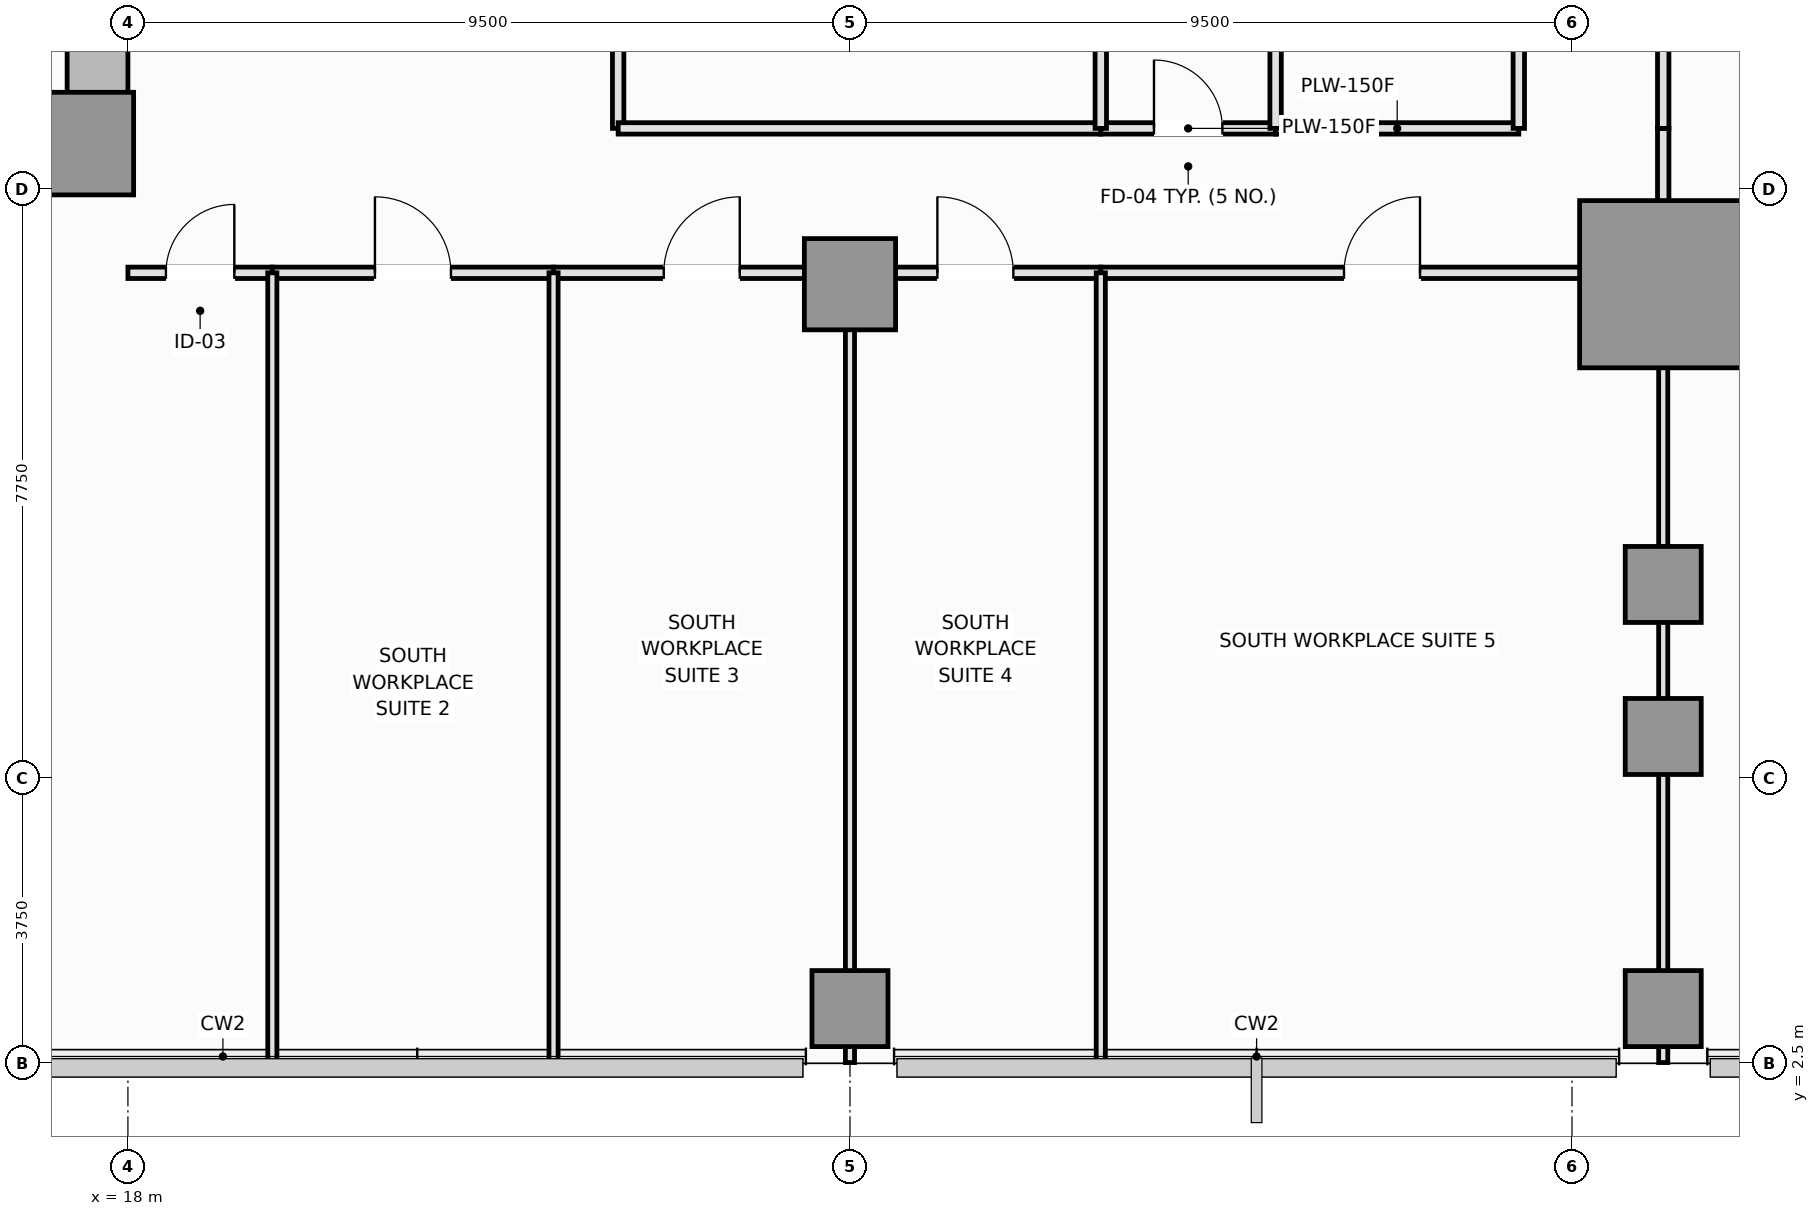
"""IFC4 building model, lengths in metres.
Left out: names, types, materials, properties, quantities, classifications, styles, units other than length and angle.
Written with IfcOpenShell. Run it as: python <this file> out.ifc"""

import sys

from ifc_helpers import new_model, si_unit, direction, frame, frame_2d, origin, origin_2d, place, context, subcontext, project, spatial, rectangle, extrude, element, fill, save


model = new_model("IFC4")
c1 = context("Model", 3, precision=1e-05, world=origin(), true_north=direction((0.0, 1.0)))
c2 = subcontext(c1, "Body", "Model", "MODEL_VIEW")
j1 = project(units=[si_unit("LENGTHUNIT", "METRE"), si_unit("PLANEANGLEUNIT", "RADIAN")], contexts=[c1])
p1 = place(None, origin())
s1 = spatial("IfcSite", under=j1, at=p1, CompositionType="ELEMENT")
p2 = place(p1, origin())
s2 = spatial("IfcBuilding", under=s1, at=p2, CompositionType="ELEMENT")
p3 = place(p2, frame((0.0, 0.0, 78.85)))
s3 = spatial("IfcBuildingStorey", under=s2, at=p3, CompositionType="ELEMENT", Elevation=78.85)
p4 = place(p3, frame((4.5, 14.4, 0.0), z_axis=(0.0, 0.0, 1.0), x_axis=(1.0, 0.0, 0.0)))
e1 = element("IfcWall", 1, at=p4, inside=s3, PredefinedType="SHEAR", context=c2, shape_type="SweptSolid", body=[
    extrude(rectangle(XDim=13.5, YDim=0.8, at=frame_2d((6.75, 0.0))), origin(), (0.0, 0.0, 1.0), 3.55),
])
p5 = place(p3, frame((17.6, 14.8, 0.0), z_axis=(0.0, 0.0, 1.0), x_axis=(0.0, 1.0, 0.0)))
e2 = element("IfcWall", 2, at=p5, inside=s3, PredefinedType="SHEAR", context=c2, shape_type="SweptSolid", body=[
    extrude(rectangle(XDim=8.65, YDim=0.8, at=frame_2d((4.325, 0.0))), origin(), (0.0, 0.0, 1.0), 3.55),
])
p6 = place(p5, frame((4.1, 0.0, 0.0)))
e3 = element("IfcOpeningElement", 3, at=p6, cuts=e2, PredefinedType="OPENING", context=c2, shape_type="SweptSolid", body=[
    extrude(rectangle(XDim=1.1, YDim=2.15, at=frame_2d((0.55, 1.075))), frame((0.0, 0.41, 0.0), z_axis=(0.0, -1.0, 0.0), x_axis=(1.0, 0.0, 0.0)), (0.0, 0.0, 1.0), 0.82),
])
p7 = place(p3, frame((17.4, 14.6, 0.0), z_axis=(0.0, 0.0, 1.0), x_axis=(1.0, 0.0, 0.0)))
e4 = element("IfcColumn", 4, at=p7, inside=s3, PredefinedType="PILASTER", context=c2, shape_type="SweptSolid", body=[
    extrude(rectangle(XDim=1.35, YDim=1.35, at=origin_2d()), origin(), (0.0, 0.0, 1.0), 3.55),
])
p8 = place(p3, frame((38.2, 12.75, 0.0), z_axis=(0.0, 0.0, 1.0), x_axis=(1.0, 0.0, 0.0)))
e5 = element("IfcColumn", 5, at=p8, inside=s3, PredefinedType="COLUMN", context=c2, shape_type="SweptSolid", body=[
    extrude(rectangle(XDim=2.2, YDim=2.2, at=origin_2d()), origin(), (0.0, 0.0, 1.0), 3.55),
])
p9 = place(p3, frame((27.5, 12.75, 0.0), z_axis=(0.0, 0.0, 1.0), x_axis=(1.0, 0.0, 0.0)))
e6 = element("IfcColumn", 6, at=p9, inside=s3, PredefinedType="COLUMN", context=c2, shape_type="SweptSolid", body=[
    extrude(rectangle(XDim=1.2, YDim=1.2, at=origin_2d()), origin(), (0.0, 0.0, 1.0), 3.55),
])
for number, where, z_axis, x_axis in (
    (7, (38.2, 6.8, 0.0), (0.0, 0.0, 1.0), (1.0, 0.0, 0.0)),
    (8, (38.2, 8.8, 0.0), (0.0, 0.0, 1.0), (1.0, 0.0, 0.0)),
    (9, (27.5, 3.22, 0.0), (0.0, 0.0, 1.0), (1.0, 0.0, 0.0)),
    (10, (38.2, 3.22, 0.0), (0.0, 0.0, 1.0), (1.0, 0.0, 0.0)),
):
    element("IfcColumn", number, at=place(p3, frame(where, z_axis=z_axis, x_axis=x_axis)), inside=s3, PredefinedType="COLUMN", context=c2, shape_type="SweptSolid", body=[
        extrude(rectangle(XDim=1.0, YDim=1.0, at=origin_2d()), origin(), (0.0, 0.0, 1.0), 3.55),
    ])
p10 = place(p3, frame((24.45, 14.8, 0.0), z_axis=(0.0, 0.0, 1.0), x_axis=(0.0, 1.0, 0.0)))
e11 = element("IfcWall", 11, at=p10, inside=s3, PredefinedType="PARTITIONING", context=c2, shape_type="SweptSolid", body=[
    extrude(rectangle(XDim=3.1, YDim=0.15, at=frame_2d((1.55, 0.0))), origin(), (0.0, 0.0, 1.0), 3.37),
])
p11 = place(p10, frame((1.05, 0.0, 0.0)))
e12 = element("IfcOpeningElement", 12, at=p11, cuts=e11, PredefinedType="OPENING", context=c2, shape_type="SweptSolid", body=[
    extrude(rectangle(XDim=1.0, YDim=2.15, at=frame_2d((0.5, 1.075))), frame((0.0, 0.085, 0.0), z_axis=(0.0, -1.0, 0.0), x_axis=(1.0, 0.0, 0.0)), (0.0, 0.0, 1.0), 0.17),
])
p12 = place(p3, frame((33.1, 14.8, 0.0), z_axis=(0.0, 0.0, 1.0), x_axis=(1.0, 0.0, 0.0)))
e13 = element("IfcWall", 13, at=p12, inside=s3, PredefinedType="PLUMBINGWALL", context=c2, shape_type="SweptSolid", body=[
    extrude(rectangle(XDim=3.2, YDim=0.15, at=frame_2d((1.6, 0.0))), origin(), (0.0, 0.0, 1.0), 3.37),
])
p13 = place(p3, frame((30.8, 14.8, 0.0), z_axis=(0.0, 0.0, 1.0), x_axis=(1.0, 0.0, 0.0)))
e14 = element("IfcWall", 14, at=p13, inside=s3, PredefinedType="PLUMBINGWALL", context=c2, shape_type="SweptSolid", body=[
    extrude(rectangle(XDim=2.3, YDim=0.15, at=frame_2d((1.15, 0.0))), origin(), (0.0, 0.0, 1.0), 3.37),
])
p14 = place(p13, frame((0.7, 0.0, 0.0)))
e15 = element("IfcOpeningElement", 15, at=p14, cuts=e14, PredefinedType="OPENING", context=c2, shape_type="SweptSolid", body=[
    extrude(rectangle(XDim=0.9, YDim=2.1, at=frame_2d((0.45, 1.05))), frame((0.0, 0.085, 0.0), z_axis=(0.0, -1.0, 0.0), x_axis=(1.0, 0.0, 0.0)), (0.0, 0.0, 1.0), 0.17),
])
p15 = place(p3, frame((24.45, 14.8, 0.0), z_axis=(0.0, 0.0, 1.0), x_axis=(1.0, 0.0, 0.0)))
e16 = element("IfcWall", 16, at=p15, inside=s3, PredefinedType="PARTITIONING", context=c2, shape_type="SweptSolid", body=[
    extrude(rectangle(XDim=6.35, YDim=0.15, at=frame_2d((3.175, 0.0))), origin(), (0.0, 0.0, 1.0), 3.37),
])
p16 = place(p3, frame((18.0, 12.9, 0.0), z_axis=(0.0, 0.0, 1.0), x_axis=(1.0, 0.0, 0.0)))
e17 = element("IfcWall", 17, at=p16, inside=s3, PredefinedType="PARTITIONING", context=c2, shape_type="SweptSolid", body=[
    extrude(rectangle(XDim=1.9, YDim=0.15, at=frame_2d((0.95, 0.0))), origin(), (0.0, 0.0, 1.0), 2.72),
])
p17 = place(p16, frame((0.5, 0.0, 0.0)))
e18 = element("IfcOpeningElement", 18, at=p17, cuts=e17, PredefinedType="OPENING", context=c2, shape_type="SweptSolid", body=[
    extrude(rectangle(XDim=0.9, YDim=2.1, at=frame_2d((0.45, 1.05))), frame((0.0, 0.085, 0.0), z_axis=(0.0, -1.0, 0.0), x_axis=(1.0, 0.0, 0.0)), (0.0, 0.0, 1.0), 0.17),
])
p18 = place(p3, frame((19.9, 12.9, 0.0), z_axis=(0.0, 0.0, 1.0), x_axis=(1.0, 0.0, 0.0)))
e19 = element("IfcWall", 19, at=p18, inside=s3, PredefinedType="PARTITIONING", context=c2, shape_type="SweptSolid", body=[
    extrude(rectangle(XDim=3.7, YDim=0.15, at=frame_2d((1.85, 0.0))), origin(), (0.0, 0.0, 1.0), 2.72),
])
p19 = place(p18, frame((1.35, 0.0, 0.0)))
e20 = element("IfcOpeningElement", 20, at=p19, cuts=e19, PredefinedType="OPENING", context=c2, shape_type="SweptSolid", body=[
    extrude(rectangle(XDim=1.0, YDim=2.15, at=frame_2d((0.5, 1.075))), frame((0.0, 0.085, 0.0), z_axis=(0.0, -1.0, 0.0), x_axis=(1.0, 0.0, 0.0)), (0.0, 0.0, 1.0), 0.17),
])
p20 = place(p3, frame((23.6, 12.9, 0.0), z_axis=(0.0, 0.0, 1.0), x_axis=(1.0, 0.0, 0.0)))
e21 = element("IfcWall", 21, at=p20, inside=s3, PredefinedType="PARTITIONING", context=c2, shape_type="SweptSolid", body=[
    extrude(rectangle(XDim=3.9, YDim=0.15, at=frame_2d((1.95, 0.0))), origin(), (0.0, 0.0, 1.0), 2.72),
])
p21 = place(p20, frame((1.45, 0.0, 0.0)))
e22 = element("IfcOpeningElement", 22, at=p21, cuts=e21, PredefinedType="OPENING", context=c2, shape_type="SweptSolid", body=[
    extrude(rectangle(XDim=1.0, YDim=2.15, at=frame_2d((0.5, 1.075))), frame((0.0, 0.085, 0.0), z_axis=(0.0, -1.0, 0.0), x_axis=(1.0, 0.0, 0.0)), (0.0, 0.0, 1.0), 0.17),
])
p22 = place(p3, frame((27.5, 12.9, 0.0), z_axis=(0.0, 0.0, 1.0), x_axis=(1.0, 0.0, 0.0)))
e23 = element("IfcWall", 23, at=p22, inside=s3, PredefinedType="PARTITIONING", context=c2, shape_type="SweptSolid", body=[
    extrude(rectangle(XDim=3.3, YDim=0.15, at=frame_2d((1.65, 0.0))), origin(), (0.0, 0.0, 1.0), 2.72),
])
p23 = place(p22, frame((1.15, 0.0, 0.0)))
e24 = element("IfcOpeningElement", 24, at=p23, cuts=e23, PredefinedType="OPENING", context=c2, shape_type="SweptSolid", body=[
    extrude(rectangle(XDim=1.0, YDim=2.15, at=frame_2d((0.5, 1.075))), frame((0.0, 0.085, 0.0), z_axis=(0.0, -1.0, 0.0), x_axis=(1.0, 0.0, 0.0)), (0.0, 0.0, 1.0), 0.17),
])
p24 = place(p3, frame((30.8, 12.9, 0.0), z_axis=(0.0, 0.0, 1.0), x_axis=(1.0, 0.0, 0.0)))
e25 = element("IfcWall", 25, at=p24, inside=s3, PredefinedType="PARTITIONING", context=c2, shape_type="SweptSolid", body=[
    extrude(rectangle(XDim=7.4, YDim=0.15, at=frame_2d((3.7, 0.0))), origin(), (0.0, 0.0, 1.0), 2.72),
])
p25 = place(p24, frame((3.2, 0.0, 0.0)))
e26 = element("IfcOpeningElement", 26, at=p25, cuts=e25, PredefinedType="OPENING", context=c2, shape_type="SweptSolid", body=[
    extrude(rectangle(XDim=1.0, YDim=2.15, at=frame_2d((0.5, 1.075))), frame((0.0, 0.085, 0.0), z_axis=(0.0, -1.0, 0.0), x_axis=(1.0, 0.0, 0.0)), (0.0, 0.0, 1.0), 0.17),
])
p26 = place(p3, frame((38.2, 12.9, 0.0), z_axis=(0.0, 0.0, 1.0), x_axis=(0.0, 1.0, 0.0)))
e27 = element("IfcWall", 27, at=p26, inside=s3, PredefinedType="PARTITIONING", context=c2, shape_type="SweptSolid", body=[
    extrude(rectangle(XDim=1.9, YDim=0.15, at=frame_2d((0.95, 0.0))), origin(), (0.0, 0.0, 1.0), 2.82),
])
p27 = place(p3, frame((36.3, 14.8, 0.0), z_axis=(0.0, 0.0, 1.0), x_axis=(0.0, 1.0, 0.0)))
e28 = element("IfcWall", 28, at=p27, inside=s3, PredefinedType="PLUMBINGWALL", context=c2, shape_type="SweptSolid", body=[
    extrude(rectangle(XDim=3.1, YDim=0.15, at=frame_2d((1.55, 0.0))), origin(), (0.0, 0.0, 1.0), 3.37),
])
p28 = place(p27, frame((1.1, 0.0, 0.0)))
e29 = element("IfcOpeningElement", 29, at=p28, cuts=e28, PredefinedType="OPENING", context=c2, shape_type="SweptSolid", body=[
    extrude(rectangle(XDim=0.9, YDim=2.1, at=frame_2d((0.45, 1.05))), frame((0.0, 0.085, 0.0), z_axis=(0.0, -1.0, 0.0), x_axis=(1.0, 0.0, 0.0)), (0.0, 0.0, 1.0), 0.17),
])
p29 = place(p3, frame((38.2, 14.8, 0.0), z_axis=(0.0, 0.0, 1.0), x_axis=(0.0, 1.0, 0.0)))
e30 = element("IfcWall", 30, at=p29, inside=s3, PredefinedType="PARTITIONING", context=c2, shape_type="SweptSolid", body=[
    extrude(rectangle(XDim=3.7, YDim=0.15, at=frame_2d((1.85, 0.0))), origin(), (0.0, 0.0, 1.0), 2.82),
])
p30 = place(p29, frame((1.35, 0.0, 0.0)))
e31 = element("IfcOpeningElement", 31, at=p30, cuts=e30, PredefinedType="OPENING", context=c2, shape_type="SweptSolid", body=[
    extrude(rectangle(XDim=1.0, YDim=2.15, at=frame_2d((0.5, 1.075))), frame((0.0, 0.085, 0.0), z_axis=(0.0, -1.0, 0.0), x_axis=(1.0, 0.0, 0.0)), (0.0, 0.0, 1.0), 0.17),
])
for number, where, z_axis, x_axis in (
    (32, (33.1, 14.8, 0.0), (0.0, 0.0, 1.0), (0.0, 1.0, 0.0)),
    (33, (30.8, 14.8, 0.0), (0.0, 0.0, 1.0), (0.0, 1.0, 0.0)),
):
    element("IfcWall", number, at=place(p3, frame(where, z_axis=z_axis, x_axis=x_axis)), inside=s3, PredefinedType="PLUMBINGWALL", context=c2, shape_type="SweptSolid", body=[
        extrude(rectangle(XDim=3.1, YDim=0.15, at=frame_2d((1.55, 0.0))), origin(), (0.0, 0.0, 1.0), 3.37),
    ])
for number, where, z_axis, x_axis in (
    (34, (19.9, 2.51, 0.0), (0.0, 0.0, 1.0), (0.0, 1.0, 0.0)),
    (35, (23.6, 2.51, 0.0), (0.0, 0.0, 1.0), (0.0, 1.0, 0.0)),
):
    element("IfcWall", number, at=place(p3, frame(where, z_axis=z_axis, x_axis=x_axis)), inside=s3, PredefinedType="PARTITIONING", context=c2, shape_type="SweptSolid", body=[
        extrude(rectangle(XDim=10.39, YDim=0.12, at=frame_2d((5.195, 0.0))), origin(), (0.0, 0.0, 1.0), 3.37),
    ])
p31 = place(p3, frame((27.5, 2.51, 0.0), z_axis=(0.0, 0.0, 1.0), x_axis=(0.0, 1.0, 0.0)))
e36 = element("IfcWall", 36, at=p31, inside=s3, PredefinedType="PARTITIONING", context=c2, shape_type="SweptSolid", body=[
    extrude(rectangle(XDim=10.39, YDim=0.12, at=frame_2d((5.195, 0.0))), origin(), (0.0, 0.0, 1.0), 2.82),
])
p32 = place(p3, frame((30.8, 2.51, 0.0), z_axis=(0.0, 0.0, 1.0), x_axis=(0.0, 1.0, 0.0)))
e37 = element("IfcWall", 37, at=p32, inside=s3, PredefinedType="PARTITIONING", context=c2, shape_type="SweptSolid", body=[
    extrude(rectangle(XDim=10.39, YDim=0.12, at=frame_2d((5.195, 0.0))), origin(), (0.0, 0.0, 1.0), 3.01),
])
p33 = place(p3, frame((38.2, 2.51, 0.0), z_axis=(0.0, 0.0, 1.0), x_axis=(0.0, 1.0, 0.0)))
e38 = element("IfcWall", 38, at=p33, inside=s3, PredefinedType="PARTITIONING", context=c2, shape_type="SweptSolid", body=[
    extrude(rectangle(XDim=10.39, YDim=0.12, at=frame_2d((5.195, 0.0))), origin(), (0.0, 0.0, 1.0), 2.82),
])
p34 = place(p14, origin())
e39 = element("IfcDoor", 39, at=p34, inside=s3, OperationType="SINGLE_SWING_LEFT", PredefinedType="DOOR", context=c2, shape_type="SweptSolid", body=[
    extrude(rectangle(XDim=0.9, YDim=2.1, at=frame_2d((0.45, 1.05))), frame((0.0, 0.025, 0.0), z_axis=(0.0, -1.0, 0.0), x_axis=(1.0, 0.0, 0.0)), (0.0, 0.0, 1.0), 0.05),
])
fill(e15, e39)
p35 = place(p17, origin())
e40 = element("IfcDoor", 40, at=p35, inside=s3, OperationType="SINGLE_SWING_RIGHT", PredefinedType="DOOR", context=c2, shape_type="SweptSolid", body=[
    extrude(rectangle(XDim=0.9, YDim=2.1, at=frame_2d((0.45, 1.05))), frame((0.0, 0.025, 0.0), z_axis=(0.0, -1.0, 0.0), x_axis=(1.0, 0.0, 0.0)), (0.0, 0.0, 1.0), 0.05),
])
fill(e18, e40)
p36 = place(p19, origin())
e41 = element("IfcDoor", 41, at=p36, inside=s3, OperationType="SINGLE_SWING_LEFT", PredefinedType="DOOR", context=c2, shape_type="SweptSolid", body=[
    extrude(rectangle(XDim=1.0, YDim=2.15, at=frame_2d((0.5, 1.075))), frame((0.0, 0.025, 0.0), z_axis=(0.0, -1.0, 0.0), x_axis=(1.0, 0.0, 0.0)), (0.0, 0.0, 1.0), 0.05),
])
fill(e20, e41)
p37 = place(p21, origin())
e42 = element("IfcDoor", 42, at=p37, inside=s3, OperationType="SINGLE_SWING_RIGHT", PredefinedType="DOOR", context=c2, shape_type="SweptSolid", body=[
    extrude(rectangle(XDim=1.0, YDim=2.15, at=frame_2d((0.5, 1.075))), frame((0.0, 0.025, 0.0), z_axis=(0.0, -1.0, 0.0), x_axis=(1.0, 0.0, 0.0)), (0.0, 0.0, 1.0), 0.05),
])
fill(e22, e42)
p38 = place(p23, origin())
e43 = element("IfcDoor", 43, at=p38, inside=s3, OperationType="SINGLE_SWING_LEFT", PredefinedType="DOOR", context=c2, shape_type="SweptSolid", body=[
    extrude(rectangle(XDim=1.0, YDim=2.15, at=frame_2d((0.5, 1.075))), frame((0.0, 0.025, 0.0), z_axis=(0.0, -1.0, 0.0), x_axis=(1.0, 0.0, 0.0)), (0.0, 0.0, 1.0), 0.05),
])
fill(e24, e43)
p39 = place(p25, origin())
e44 = element("IfcDoor", 44, at=p39, inside=s3, OperationType="SINGLE_SWING_RIGHT", PredefinedType="DOOR", context=c2, shape_type="SweptSolid", body=[
    extrude(rectangle(XDim=1.0, YDim=2.15, at=frame_2d((0.5, 1.075))), frame((0.0, 0.025, 0.0), z_axis=(0.0, -1.0, 0.0), x_axis=(1.0, 0.0, 0.0)), (0.0, 0.0, 1.0), 0.05),
])
fill(e26, e44)
save(model, sys.argv[1])
